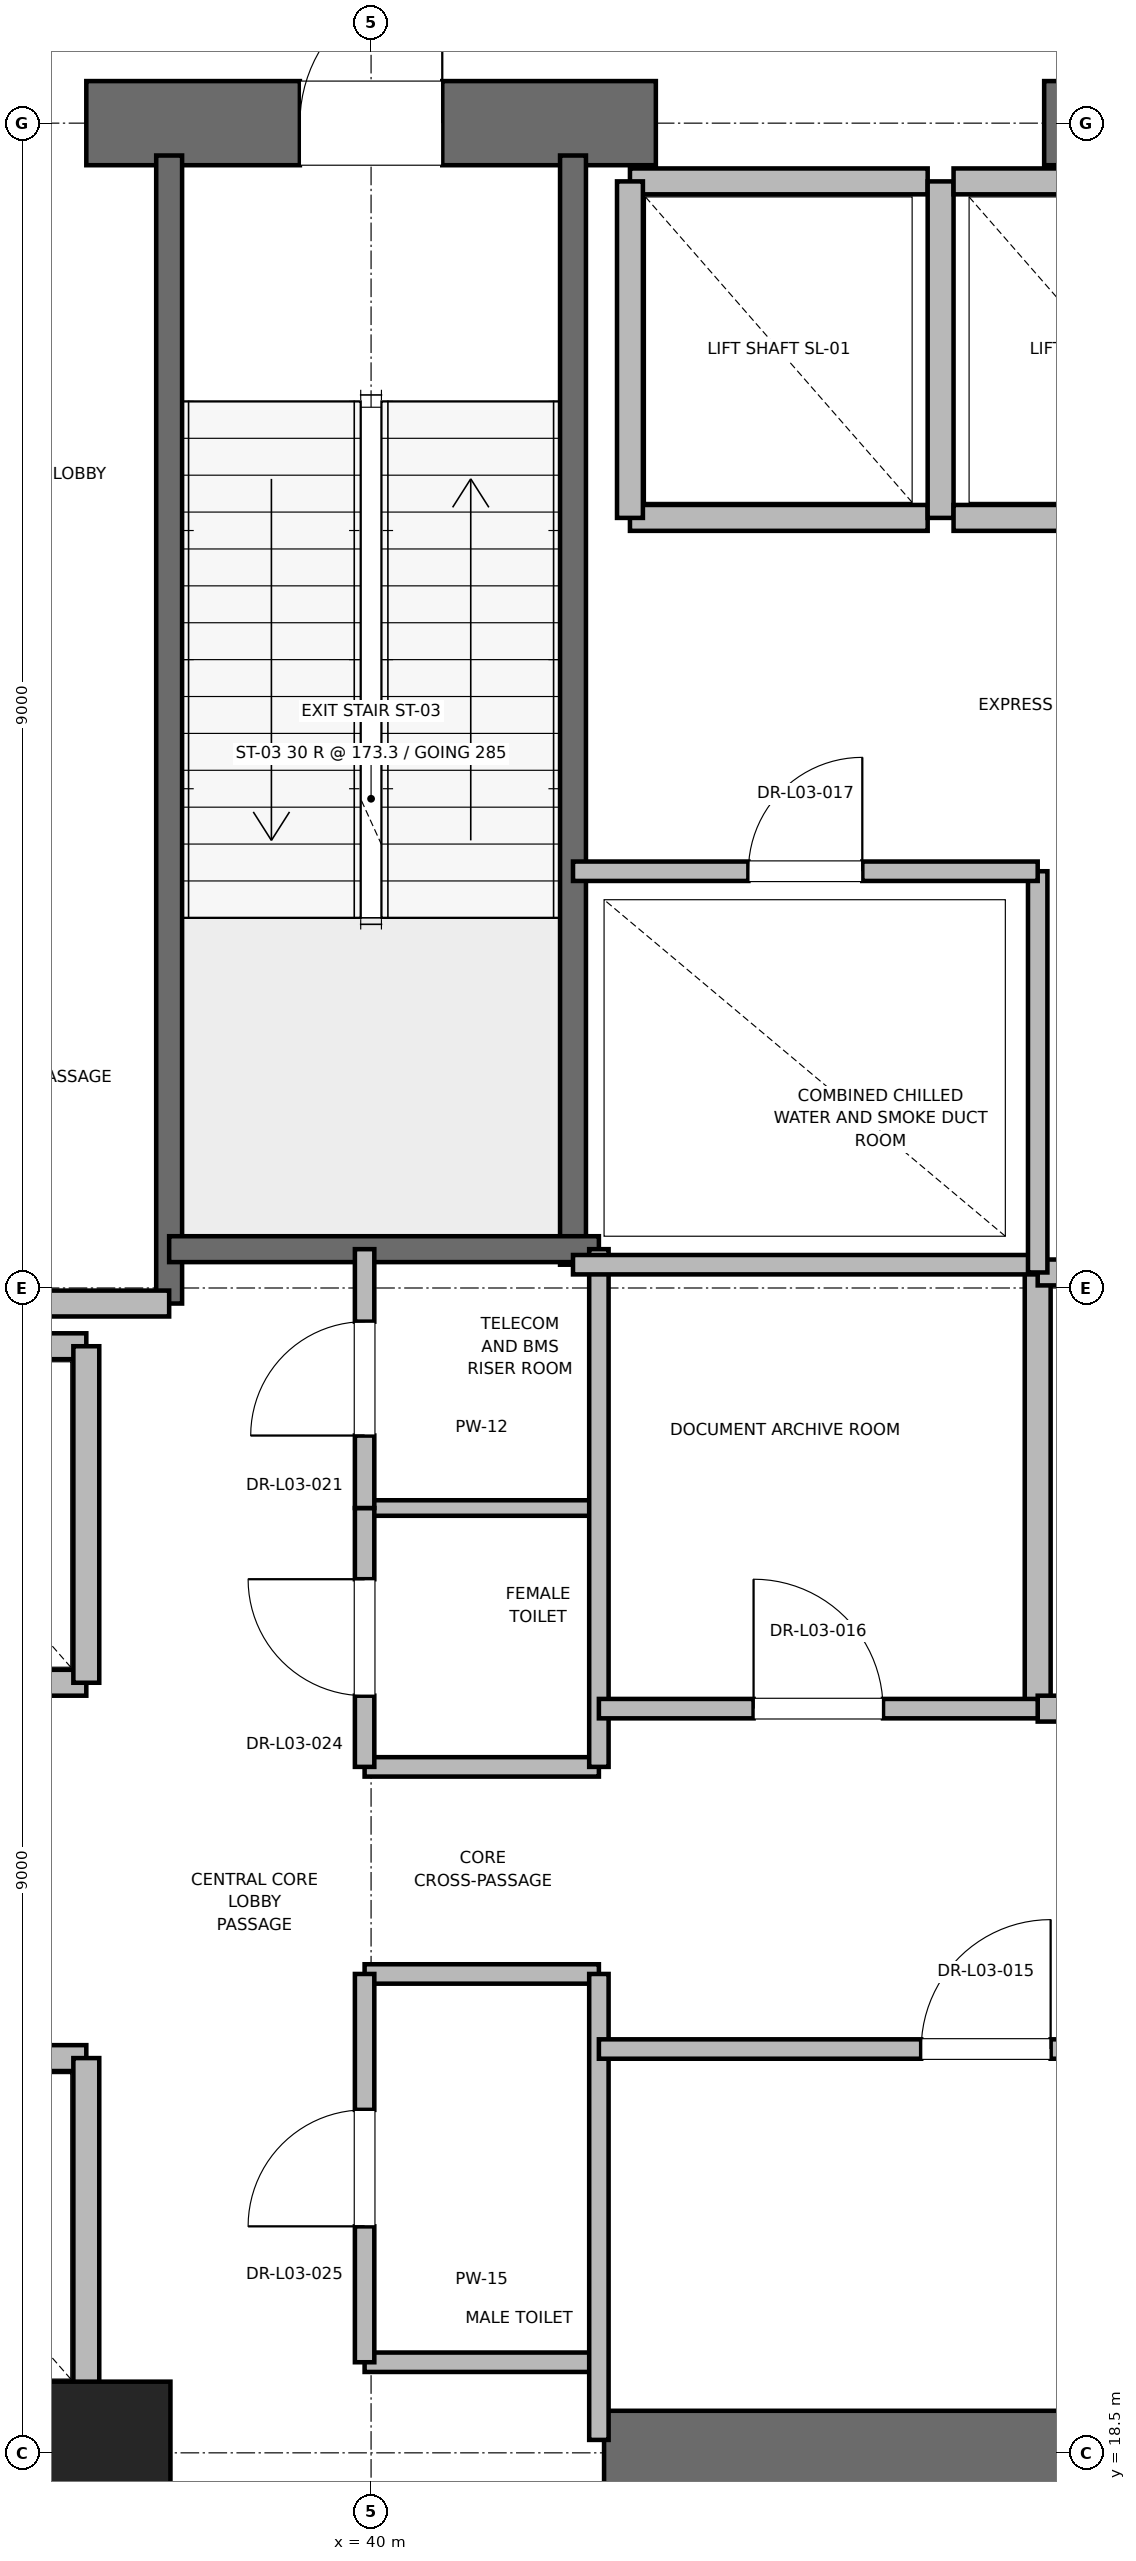
"""IFC4 building model, lengths in metres.
Left out: names, types, materials, properties, quantities, classifications, styles, units other than length and angle.
Written with IfcOpenShell. Run it as: python <this file> out.ifc"""

import sys

from ifc_helpers import new_model, si_unit, direction, frame, frame_2d, origin, origin_2d, place, context, subcontext, project, spatial, rectangle, extrude, element, fill, save


model = new_model("IFC4")
c1 = context("Model", 3, precision=1e-05, world=origin(), true_north=direction((0.0, 1.0)))
c2 = subcontext(c1, "Body", "Model", "MODEL_VIEW")
j1 = project(units=[si_unit("LENGTHUNIT", "METRE"), si_unit("PLANEANGLEUNIT", "RADIAN")], contexts=[c1])
p1 = place(None, origin())
s1 = spatial("IfcSite", under=j1, at=p1, CompositionType="ELEMENT")
p2 = place(p1, origin())
s2 = spatial("IfcBuilding", under=s1, at=p2, CompositionType="ELEMENT")
p3 = place(p2, frame((0.0, 0.0, 16.4)))
s3 = spatial("IfcBuildingStorey", under=s2, at=p3, CompositionType="ELEMENT", Elevation=16.4)
p4 = place(p3, frame((37.9, 18.5, 0.0), z_axis=(0.0, 0.0, 1.0), x_axis=(1.0, 0.0, 0.0)))
e1 = element("IfcColumn", 1, at=p4, inside=s3, PredefinedType="PILASTER", context=c2, shape_type="SweptSolid", body=[
    extrude(rectangle(XDim=1.1, YDim=1.1, at=origin_2d()), origin(), (0.0, 0.0, 1.0), 5.2),
])
for number, where, z_axis, x_axis in (
    (2, (29.0, 18.5, 0.0), (0.0, 0.0, 1.0), (1.0, 0.0, 0.0)),
    (3, (41.8, 18.5, 0.0), (0.0, 0.0, 1.0), (1.0, 0.0, 0.0)),
):
    element("IfcWall", number, at=place(p3, frame(where, z_axis=z_axis, x_axis=x_axis)), inside=s3, PredefinedType="SHEAR", context=c2, shape_type="SweptSolid", body=[
        extrude(rectangle(XDim=9.2, YDim=0.65, at=frame_2d((4.6, 0.0))), origin(), (0.0, 0.0, 1.0), 4.9),
    ])
p5 = place(p3, frame((37.8, 36.5, 0.0), z_axis=(0.0, 0.0, 1.0), x_axis=(1.0, 0.0, 0.0)))
e4 = element("IfcWall", 4, at=p5, inside=s3, PredefinedType="SHEAR", context=c2, shape_type="SweptSolid", body=[
    extrude(rectangle(XDim=4.4, YDim=0.65, at=frame_2d((2.2, 0.0))), origin(), (0.0, 0.0, 1.0), 4.9),
])
p6 = place(p5, frame((1.65, 0.0, 0.0)))
e5 = element("IfcOpeningElement", 5, at=p6, cuts=e4, PredefinedType="OPENING", context=c2, shape_type="SweptSolid", body=[
    extrude(rectangle(XDim=1.1, YDim=2.15, at=frame_2d((0.55, 1.075))), frame((0.0, 0.325, 0.0), z_axis=(0.0, -1.0, 0.0), x_axis=(1.0, 0.0, 0.0)), (0.0, 0.0, 1.0), 0.65),
])
p7 = place(p3, frame((45.2, 36.5, 0.0), z_axis=(0.0, 0.0, 1.0), x_axis=(1.0, 0.0, 0.0)))
e6 = element("IfcWall", 6, at=p7, inside=s3, PredefinedType="SHEAR", context=c2, shape_type="SweptSolid", body=[
    extrude(rectangle(XDim=5.8, YDim=0.65, at=frame_2d((2.9, 0.0))), origin(), (0.0, 0.0, 1.0), 4.9),
])
p8 = place(p3, frame((38.44, 27.38, 0.0), z_axis=(0.0, 0.0, 1.0), x_axis=(0.0, 1.0, 0.0)))
e7 = element("IfcWall", 7, at=p8, inside=s3, PredefinedType="SOLIDWALL", context=c2, shape_type="SweptSolid", body=[
    extrude(rectangle(XDim=8.87, YDim=0.2, at=frame_2d((4.435, 0.0))), origin(), (0.0, 0.0, 1.0), 4.9),
])
p9 = place(p3, frame((41.56, 27.68, 0.0), z_axis=(0.0, 0.0, 1.0), x_axis=(0.0, 1.0, 0.0)))
e8 = element("IfcWall", 8, at=p9, inside=s3, PredefinedType="SOLIDWALL", context=c2, shape_type="SweptSolid", body=[
    extrude(rectangle(XDim=8.57, YDim=0.2, at=frame_2d((4.285, 0.0))), origin(), (0.0, 0.0, 1.0), 4.9),
])
p10 = place(p3, frame((38.44, 27.8, 0.0), z_axis=(0.0, 0.0, 1.0), x_axis=(1.0, 0.0, 0.0)))
e9 = element("IfcWall", 9, at=p10, inside=s3, PredefinedType="SOLIDWALL", context=c2, shape_type="SweptSolid", body=[
    extrude(rectangle(XDim=3.32, YDim=0.2, at=frame_2d((1.66, 0.0))), origin(), (0.0, 0.0, 1.0), 4.9),
])
p11 = place(p3, frame((32.82, 27.38, 0.0), z_axis=(0.0, 0.0, 1.0), x_axis=(1.0, 0.0, 0.0)))
e10 = element("IfcWall", 10, at=p11, inside=s3, PredefinedType="PARTITIONING", context=c2, shape_type="SweptSolid", body=[
    extrude(rectangle(XDim=5.62, YDim=0.2, at=frame_2d((2.81, 0.0))), origin(), (0.0, 0.0, 1.0), 4.9),
])
p12 = place(p3, frame((45.15, 24.25, 0.0), z_axis=(0.0, 0.0, 1.0), x_axis=(0.0, 1.0, 0.0)))
e11 = element("IfcWall", 11, at=p12, inside=s3, PredefinedType="PARTITIONING", context=c2, shape_type="SweptSolid", body=[
    extrude(rectangle(XDim=3.37, YDim=0.2, at=frame_2d((1.685, 0.0))), origin(), (0.0, 0.0, 1.0), 4.9),
])
p13 = place(p3, frame((45.15, 24.25, 0.0), z_axis=(0.0, 0.0, 1.0), x_axis=(1.0, 0.0, 0.0)))
e12 = element("IfcWall", 12, at=p13, inside=s3, PredefinedType="PARTITIONING", context=c2, shape_type="SweptSolid", body=[
    extrude(rectangle(XDim=2.7, YDim=0.2, at=frame_2d((1.35, 0.0))), origin(), (0.0, 0.0, 1.0), 4.9),
])
p14 = place(p13, frame((0.775, 0.0, 0.0)))
e13 = element("IfcOpeningElement", 13, at=p14, cuts=e12, PredefinedType="OPENING", context=c2, shape_type="SweptSolid", body=[
    extrude(rectangle(XDim=1.15, YDim=2.2, at=frame_2d((0.575, 1.1))), frame((0.0, 0.1, 0.0), z_axis=(0.0, -1.0, 0.0), x_axis=(1.0, 0.0, 0.0)), (0.0, 0.0, 1.0), 0.2),
])
p15 = place(p3, frame((45.15, 27.62, 0.0), z_axis=(0.0, 0.0, 1.0), x_axis=(1.0, 0.0, 0.0)))
e14 = element("IfcWall", 14, at=p15, inside=s3, PredefinedType="PARTITIONING", context=c2, shape_type="SweptSolid", body=[
    extrude(rectangle(XDim=2.03, YDim=0.2, at=frame_2d((1.015, 0.0))), origin(), (0.0, 0.0, 1.0), 4.9),
])
p16 = place(p15, frame((0.44, 0.0, 0.0)))
e15 = element("IfcOpeningElement", 15, at=p16, cuts=e14, PredefinedType="OPENING", context=c2, shape_type="SweptSolid", body=[
    extrude(rectangle(XDim=1.15, YDim=2.2, at=frame_2d((0.575, 1.1))), frame((0.0, 0.1, 0.0), z_axis=(0.0, -1.0, 0.0), x_axis=(1.0, 0.0, 0.0)), (0.0, 0.0, 1.0), 0.2),
])
p17 = place(p3, frame((35.5, 18.95, 0.0), z_axis=(0.0, 0.0, 1.0), x_axis=(1.0, 0.0, 0.0)))
e16 = element("IfcWall", 16, at=p17, inside=s3, PredefinedType="SOLIDWALL", context=c2, shape_type="SweptSolid", body=[
    extrude(rectangle(XDim=2.3, YDim=0.2, at=frame_2d((1.15, 0.0))), origin(), (0.0, 0.0, 1.0), 3.68),
])
p18 = place(p3, frame((37.8, 21.55, 0.0), z_axis=(0.0, 0.0, 1.0), x_axis=(-1.0, 0.0, 0.0)))
e17 = element("IfcWall", 17, at=p18, inside=s3, PredefinedType="SOLIDWALL", context=c2, shape_type="SweptSolid", body=[
    extrude(rectangle(XDim=2.3, YDim=0.2, at=frame_2d((1.15, 0.0))), origin(), (0.0, 0.0, 1.0), 4.9),
])
p19 = place(p3, frame((37.8, 18.95, 0.0), z_axis=(0.0, 0.0, 1.0), x_axis=(0.0, 1.0, 0.0)))
e18 = element("IfcWall", 18, at=p19, inside=s3, PredefinedType="SOLIDWALL", context=c2, shape_type="SweptSolid", body=[
    extrude(rectangle(XDim=2.6, YDim=0.2, at=frame_2d((1.3, 0.0))), origin(), (0.0, 0.0, 1.0), 3.68),
])
for number, where, z_axis, x_axis in (
    (19, (35.5, 24.45, 0.0), (0.0, 0.0, 1.0), (1.0, 0.0, 0.0)),
    (20, (37.8, 27.05, 0.0), (0.0, 0.0, 1.0), (-1.0, 0.0, 0.0)),
):
    element("IfcWall", number, at=place(p3, frame(where, z_axis=z_axis, x_axis=x_axis)), inside=s3, PredefinedType="SOLIDWALL", context=c2, shape_type="SweptSolid", body=[
        extrude(rectangle(XDim=2.3, YDim=0.2, at=frame_2d((1.15, 0.0))), origin(), (0.0, 0.0, 1.0), 4.9),
    ])
p20 = place(p3, frame((37.8, 24.45, 0.0), z_axis=(0.0, 0.0, 1.0), x_axis=(0.0, 1.0, 0.0)))
e21 = element("IfcWall", 21, at=p20, inside=s3, PredefinedType="SOLIDWALL", context=c2, shape_type="SweptSolid", body=[
    extrude(rectangle(XDim=2.6, YDim=0.2, at=frame_2d((1.3, 0.0))), origin(), (0.0, 0.0, 1.0), 4.9),
])
p21 = place(p3, frame((42.0, 33.45, 0.0), z_axis=(0.0, 0.0, 1.0), x_axis=(1.0, 0.0, 0.0)))
e22 = element("IfcWall", 22, at=p21, inside=s3, PredefinedType="SOLIDWALL", context=c2, shape_type="SweptSolid", body=[
    extrude(rectangle(XDim=2.3, YDim=0.2, at=frame_2d((1.15, 0.0))), origin(), (0.0, 0.0, 1.0), 4.9),
])
p22 = place(p3, frame((44.3, 36.05, 0.0), z_axis=(0.0, 0.0, 1.0), x_axis=(-1.0, 0.0, 0.0)))
e23 = element("IfcWall", 23, at=p22, inside=s3, PredefinedType="SOLIDWALL", context=c2, shape_type="SweptSolid", body=[
    extrude(rectangle(XDim=2.3, YDim=0.2, at=frame_2d((1.15, 0.0))), origin(), (0.0, 0.0, 1.0), 3.68),
])
for number, where, z_axis, x_axis in (
    (24, (42.0, 36.05, 0.0), (0.0, 0.0, 1.0), (0.0, -1.0, 0.0)),
    (25, (44.4, 33.45, 0.0), (0.0, 0.0, 1.0), (0.0, 1.0, 0.0)),
):
    element("IfcWall", number, at=place(p3, frame(where, z_axis=z_axis, x_axis=x_axis)), inside=s3, PredefinedType="SOLIDWALL", context=c2, shape_type="SweptSolid", body=[
        extrude(rectangle(XDim=2.6, YDim=0.2, at=frame_2d((1.3, 0.0))), origin(), (0.0, 0.0, 1.0), 3.68),
    ])
p23 = place(p3, frame((44.5, 33.45, 0.0), z_axis=(0.0, 0.0, 1.0), x_axis=(1.0, 0.0, 0.0)))
e26 = element("IfcWall", 26, at=p23, inside=s3, PredefinedType="SOLIDWALL", context=c2, shape_type="SweptSolid", body=[
    extrude(rectangle(XDim=2.3, YDim=0.2, at=frame_2d((1.15, 0.0))), origin(), (0.0, 0.0, 1.0), 4.9),
])
p24 = place(p3, frame((46.8, 36.05, 0.0), z_axis=(0.0, 0.0, 1.0), x_axis=(-1.0, 0.0, 0.0)))
e27 = element("IfcWall", 27, at=p24, inside=s3, PredefinedType="SOLIDWALL", context=c2, shape_type="SweptSolid", body=[
    extrude(rectangle(XDim=2.3, YDim=0.2, at=frame_2d((1.15, 0.0))), origin(), (0.0, 0.0, 1.0), 3.68),
])
for number, where, z_axis, x_axis in (
    (28, (39.95, 19.2, 0.0), (0.0, 0.0, 1.0), (1.0, 0.0, 0.0)),
    (29, (39.95, 22.2, 0.0), (0.0, 0.0, 1.0), (1.0, 0.0, 0.0)),
    (30, (39.95, 23.8, 0.0), (0.0, 0.0, 1.0), (1.0, 0.0, 0.0)),
):
    element("IfcWall", number, at=place(p3, frame(where, z_axis=z_axis, x_axis=x_axis)), inside=s3, PredefinedType="PARTITIONING", context=c2, shape_type="SweptSolid", body=[
        extrude(rectangle(XDim=1.81, YDim=0.15, at=frame_2d((0.905, 0.0))), origin(), (0.0, 0.0, 1.0), 2.85),
    ])
p25 = place(p3, frame((39.95, 25.8, 0.0), z_axis=(0.0, 0.0, 1.0), x_axis=(1.0, 0.0, 0.0)))
e31 = element("IfcWall", 31, at=p25, inside=s3, PredefinedType="PARTITIONING", context=c2, shape_type="SweptSolid", body=[
    extrude(rectangle(XDim=1.81, YDim=0.12, at=frame_2d((0.905, 0.0))), origin(), (0.0, 0.0, 1.0), 2.85),
])
p26 = place(p3, frame((41.76, 18.6, 0.0), z_axis=(0.0, 0.0, 1.0), x_axis=(0.0, 1.0, 0.0)))
e32 = element("IfcWall", 32, at=p26, inside=s3, PredefinedType="PARTITIONING", context=c2, shape_type="SweptSolid", body=[
    extrude(rectangle(XDim=3.6, YDim=0.15, at=frame_2d((1.8, 0.0))), origin(), (0.0, 0.0, 1.0), 2.85),
])
p27 = place(p3, frame((41.76, 23.8, 0.0), z_axis=(0.0, 0.0, 1.0), x_axis=(0.0, 1.0, 0.0)))
e33 = element("IfcWall", 33, at=p27, inside=s3, PredefinedType="PARTITIONING", context=c2, shape_type="SweptSolid", body=[
    extrude(rectangle(XDim=4.0, YDim=0.15, at=frame_2d((2.0, 0.0))), origin(), (0.0, 0.0, 1.0), 2.85),
])
p28 = place(p3, frame((39.95, 19.2, 0.0), z_axis=(0.0, 0.0, 1.0), x_axis=(0.0, 1.0, 0.0)))
e34 = element("IfcWall", 34, at=p28, inside=s3, PredefinedType="PARTITIONING", context=c2, shape_type="SweptSolid", body=[
    extrude(rectangle(XDim=3.0, YDim=0.15, at=frame_2d((1.5, 0.0))), origin(), (0.0, 0.0, 1.0), 2.85),
])
p29 = place(p28, frame((1.05, 0.0, 0.0)))
e35 = element("IfcOpeningElement", 35, at=p29, cuts=e34, PredefinedType="OPENING", context=c2, shape_type="SweptSolid", body=[
    extrude(rectangle(XDim=0.9, YDim=2.1, at=frame_2d((0.45, 1.05))), frame((0.0, 0.075, 0.0), z_axis=(0.0, -1.0, 0.0), x_axis=(1.0, 0.0, 0.0)), (0.0, 0.0, 1.0), 0.15),
])
p30 = place(p3, frame((39.95, 23.8, 0.0), z_axis=(0.0, 0.0, 1.0), x_axis=(0.0, 1.0, 0.0)))
e36 = element("IfcWall", 36, at=p30, inside=s3, PredefinedType="PARTITIONING", context=c2, shape_type="SweptSolid", body=[
    extrude(rectangle(XDim=2.0, YDim=0.15, at=frame_2d((1.0, 0.0))), origin(), (0.0, 0.0, 1.0), 2.85),
])
p31 = place(p30, frame((0.55, 0.0, 0.0)))
e37 = element("IfcOpeningElement", 37, at=p31, cuts=e36, PredefinedType="OPENING", context=c2, shape_type="SweptSolid", body=[
    extrude(rectangle(XDim=0.9, YDim=2.1, at=frame_2d((0.45, 1.05))), frame((0.0, 0.075, 0.0), z_axis=(0.0, -1.0, 0.0), x_axis=(1.0, 0.0, 0.0)), (0.0, 0.0, 1.0), 0.15),
])
p32 = place(p3, frame((39.95, 25.8, 0.0), z_axis=(0.0, 0.0, 1.0), x_axis=(0.0, 1.0, 0.0)))
e38 = element("IfcWall", 38, at=p32, inside=s3, PredefinedType="PARTITIONING", context=c2, shape_type="SweptSolid", body=[
    extrude(rectangle(XDim=2.0, YDim=0.15, at=frame_2d((1.0, 0.0))), origin(), (0.0, 0.0, 1.0), 2.85),
])
p33 = place(p32, frame((0.56, 0.0, 0.0)))
e39 = element("IfcOpeningElement", 39, at=p33, cuts=e38, PredefinedType="OPENING", context=c2, shape_type="SweptSolid", body=[
    extrude(rectangle(XDim=0.88, YDim=2.1, at=frame_2d((0.44, 1.05))), frame((0.0, 0.075, 0.0), z_axis=(0.0, -1.0, 0.0), x_axis=(1.0, 0.0, 0.0)), (0.0, 0.0, 1.0), 0.15),
])
p34 = place(p3, frame((41.56, 27.68, 0.0), z_axis=(0.0, 0.0, 1.0), x_axis=(1.0, 0.0, 0.0)))
e40 = element("IfcWall", 40, at=p34, inside=s3, PredefinedType="PARTITIONING", context=c2, shape_type="SweptSolid", body=[
    extrude(rectangle(XDim=3.59, YDim=0.15, at=frame_2d((1.795, 0.0))), origin(), (0.0, 0.0, 1.0), 2.85),
])
p35 = place(p3, frame((41.76, 21.62, 0.0), z_axis=(0.0, 0.0, 1.0), x_axis=(1.0, 0.0, 0.0)))
e41 = element("IfcWall", 41, at=p35, inside=s3, PredefinedType="PARTITIONING", context=c2, shape_type="SweptSolid", body=[
    extrude(rectangle(XDim=5.98, YDim=0.15, at=frame_2d((2.99, 0.0))), origin(), (0.0, 0.0, 1.0), 2.85),
])
p36 = place(p35, frame((2.49, 0.0, 0.0)))
e42 = element("IfcOpeningElement", 42, at=p36, cuts=e41, PredefinedType="OPENING", context=c2, shape_type="SweptSolid", body=[
    extrude(rectangle(XDim=1.0, YDim=2.15, at=frame_2d((0.5, 1.075))), frame((0.0, 0.075, 0.0), z_axis=(0.0, -1.0, 0.0), x_axis=(1.0, 0.0, 0.0)), (0.0, 0.0, 1.0), 0.15),
])
p37 = place(p3, frame((41.76, 24.25, 0.0), z_axis=(0.0, 0.0, 1.0), x_axis=(1.0, 0.0, 0.0)))
e43 = element("IfcWall", 43, at=p37, inside=s3, PredefinedType="PARTITIONING", context=c2, shape_type="SweptSolid", body=[
    extrude(rectangle(XDim=3.39, YDim=0.15, at=frame_2d((1.695, 0.0))), origin(), (0.0, 0.0, 1.0), 2.85),
])
p38 = place(p37, frame((1.195, 0.0, 0.0)))
e44 = element("IfcOpeningElement", 44, at=p38, cuts=e43, PredefinedType="OPENING", context=c2, shape_type="SweptSolid", body=[
    extrude(rectangle(XDim=1.0, YDim=2.15, at=frame_2d((0.5, 1.075))), frame((0.0, 0.075, 0.0), z_axis=(0.0, -1.0, 0.0), x_axis=(1.0, 0.0, 0.0)), (0.0, 0.0, 1.0), 0.15),
])
p39 = place(p3, frame((45.15, 27.62, 0.0), z_axis=(0.0, 0.0, 1.0), x_axis=(0.0, 1.0, 0.0)))
e45 = element("IfcWall", 45, at=p39, inside=s3, PredefinedType="PARTITIONING", context=c2, shape_type="SweptSolid", body=[
    extrude(rectangle(XDim=3.1, YDim=0.15, at=frame_2d((1.55, 0.0))), origin(), (0.0, 0.0, 1.0), 2.85),
])
p40 = place(p3, frame((41.56, 30.72, 0.0), z_axis=(0.0, 0.0, 1.0), x_axis=(1.0, 0.0, 0.0)))
e46 = element("IfcWall", 46, at=p40, inside=s3, PredefinedType="PARTITIONING", context=c2, shape_type="SweptSolid", body=[
    extrude(rectangle(XDim=3.59, YDim=0.15, at=frame_2d((1.795, 0.0))), origin(), (0.0, 0.0, 1.0), 2.85),
])
p41 = place(p40, frame((1.355, 0.0, 0.0)))
e47 = element("IfcOpeningElement", 47, at=p41, cuts=e46, PredefinedType="OPENING", context=c2, shape_type="SweptSolid", body=[
    extrude(rectangle(XDim=0.88, YDim=2.1, at=frame_2d((0.44, 1.05))), frame((0.0, 0.075, 0.0), z_axis=(0.0, -1.0, 0.0), x_axis=(1.0, 0.0, 0.0)), (0.0, 0.0, 1.0), 0.15),
])
p42 = place(p6, origin())
e48 = element("IfcDoor", 48, at=p42, inside=s3, OperationType="SINGLE_SWING_RIGHT", PredefinedType="DOOR", context=c2, shape_type="SweptSolid", body=[
    extrude(rectangle(XDim=1.1, YDim=2.15, at=frame_2d((0.55, 1.075))), frame((0.0, 0.025, 0.0), z_axis=(0.0, -1.0, 0.0), x_axis=(1.0, 0.0, 0.0)), (0.0, 0.0, 1.0), 0.05),
])
fill(e5, e48)
p43 = place(p29, origin())
e49 = element("IfcDoor", 49, at=p43, inside=s3, OperationType="SINGLE_SWING_LEFT", PredefinedType="DOOR", context=c2, shape_type="SweptSolid", body=[
    extrude(rectangle(XDim=0.9, YDim=2.1, at=frame_2d((0.45, 1.05))), frame((0.0, 0.025, 0.0), z_axis=(0.0, -1.0, 0.0), x_axis=(1.0, 0.0, 0.0)), (0.0, 0.0, 1.0), 0.05),
])
fill(e35, e49)
p44 = place(p31, origin())
e50 = element("IfcDoor", 50, at=p44, inside=s3, OperationType="SINGLE_SWING_RIGHT", PredefinedType="DOOR", context=c2, shape_type="SweptSolid", body=[
    extrude(rectangle(XDim=0.9, YDim=2.1, at=frame_2d((0.45, 1.05))), frame((0.0, 0.025, 0.0), z_axis=(0.0, -1.0, 0.0), x_axis=(1.0, 0.0, 0.0)), (0.0, 0.0, 1.0), 0.05),
])
fill(e37, e50)
p45 = place(p33, origin())
e51 = element("IfcDoor", 51, at=p45, inside=s3, OperationType="SINGLE_SWING_LEFT", PredefinedType="DOOR", context=c2, shape_type="SweptSolid", body=[
    extrude(rectangle(XDim=0.88, YDim=2.1, at=frame_2d((0.44, 1.05))), frame((0.0, 0.025, 0.0), z_axis=(0.0, -1.0, 0.0), x_axis=(1.0, 0.0, 0.0)), (0.0, 0.0, 1.0), 0.05),
])
fill(e39, e51)
p46 = place(p36, origin())
e52 = element("IfcDoor", 52, at=p46, inside=s3, OperationType="SINGLE_SWING_RIGHT", PredefinedType="DOOR", context=c2, shape_type="SweptSolid", body=[
    extrude(rectangle(XDim=1.0, YDim=2.15, at=frame_2d((0.5, 1.075))), frame((0.0, 0.025, 0.0), z_axis=(0.0, -1.0, 0.0), x_axis=(1.0, 0.0, 0.0)), (0.0, 0.0, 1.0), 0.05),
])
fill(e42, e52)
p47 = place(p38, origin())
e53 = element("IfcDoor", 53, at=p47, inside=s3, OperationType="SINGLE_SWING_LEFT", PredefinedType="DOOR", context=c2, shape_type="SweptSolid", body=[
    extrude(rectangle(XDim=1.0, YDim=2.15, at=frame_2d((0.5, 1.075))), frame((0.0, 0.025, 0.0), z_axis=(0.0, -1.0, 0.0), x_axis=(1.0, 0.0, 0.0)), (0.0, 0.0, 1.0), 0.05),
])
fill(e44, e53)
p48 = place(p41, origin())
e54 = element("IfcDoor", 54, at=p48, inside=s3, OperationType="SINGLE_SWING_RIGHT", PredefinedType="DOOR", context=c2, shape_type="SweptSolid", body=[
    extrude(rectangle(XDim=0.88, YDim=2.1, at=frame_2d((0.44, 1.05))), frame((0.0, 0.025, 0.0), z_axis=(0.0, -1.0, 0.0), x_axis=(1.0, 0.0, 0.0)), (0.0, 0.0, 1.0), 0.05),
])
fill(e47, e54)
save(model, sys.argv[1])
